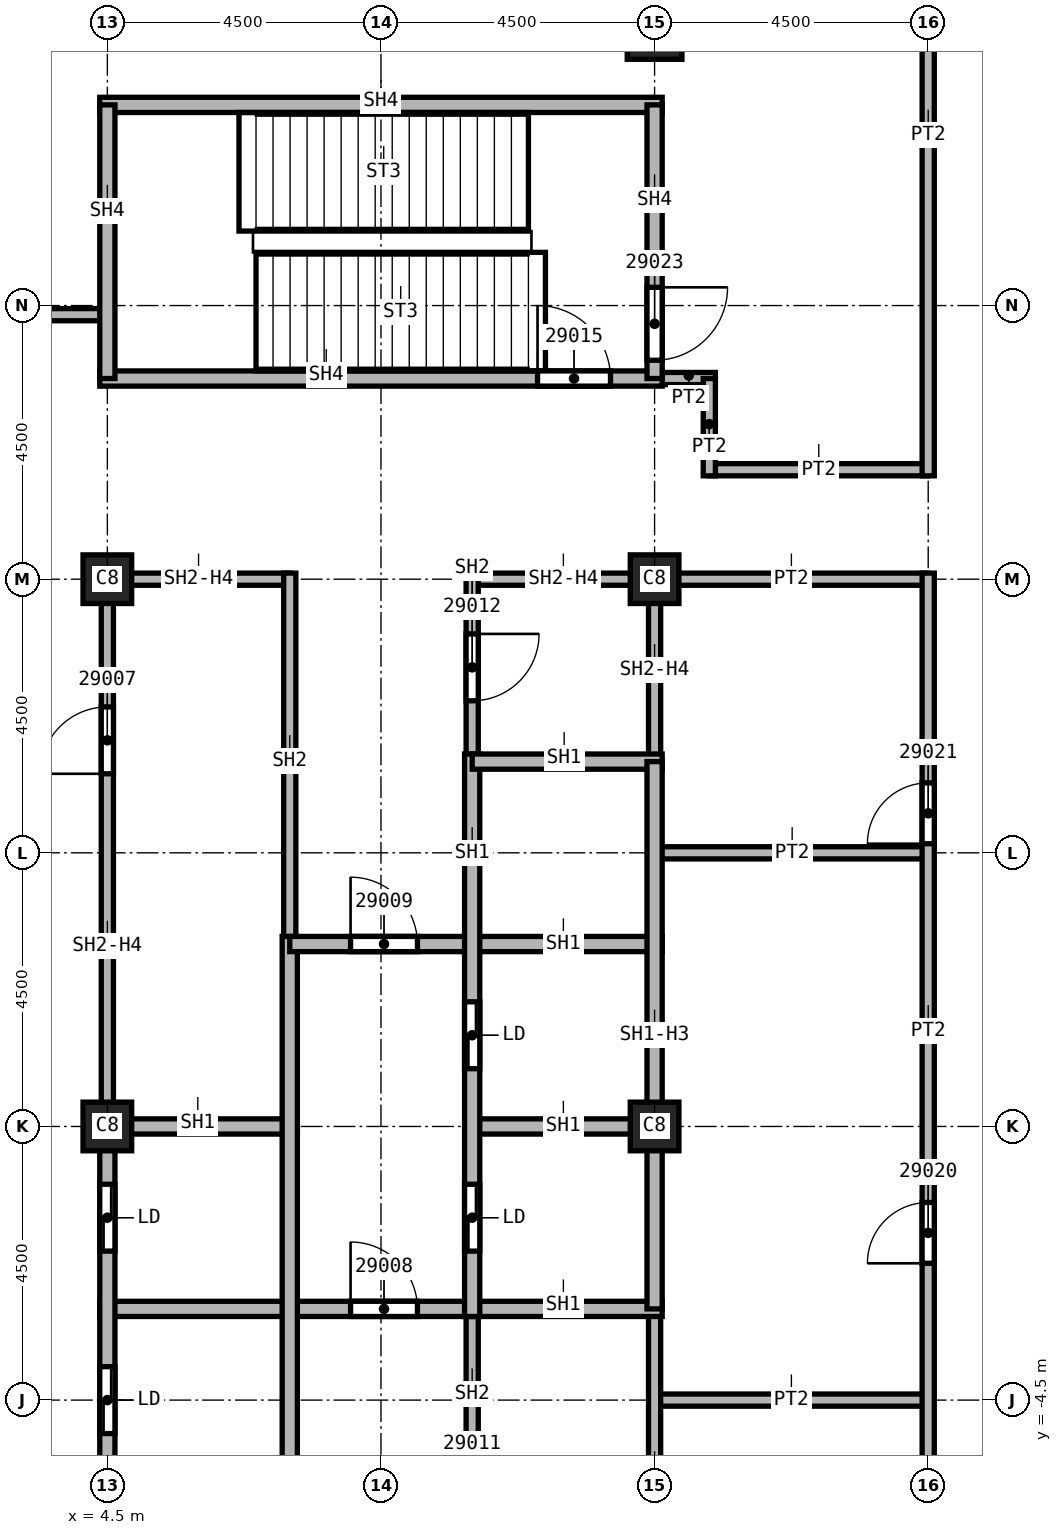
"""IFC4 building model, lengths in metres.
Left out: names, types, materials, properties, quantities, classifications, styles, units other than length and angle.
Written with IfcOpenShell. Run it as: python <this file> out.ifc"""

import sys

from ifc_helpers import new_model, si_unit, direction, frame, frame_2d, origin, origin_2d, place, context, subcontext, project, spatial, rectangle, extrude, element, fill, save


model = new_model("IFC4")
c1 = context("Model", 3, precision=1e-05, world=origin(), true_north=direction((0.0, 1.0)))
c2 = subcontext(c1, "Body", "Model", "MODEL_VIEW")
j1 = project(units=[si_unit("LENGTHUNIT", "METRE"), si_unit("PLANEANGLEUNIT", "RADIAN")], contexts=[c1])
p1 = place(None, origin())
s1 = spatial("IfcSite", under=j1, at=p1, CompositionType="ELEMENT")
p2 = place(p1, origin())
s2 = spatial("IfcBuilding", under=s1, at=p2, CompositionType="ELEMENT")
p3 = place(p2, frame((0.0, 0.0, 294.0)))
s3 = spatial("IfcBuildingStorey", under=s2, at=p3, CompositionType="ELEMENT", Elevation=294.0)
p4 = place(p3, frame((13.5, 18.0, 0.0), z_axis=(0.0, 0.0, 1.0), x_axis=(1.0, 0.0, 0.0)))
e1 = element("IfcColumn", 1, at=p4, inside=s3, PredefinedType="COLUMN", context=c2, shape_type="SweptSolid", body=[
    extrude(rectangle(XDim=0.9, YDim=0.9, at=origin_2d()), origin(), (0.0, 0.0, 1.0), 5.74),
])
for number, where, z_axis, x_axis in (
    (2, (4.5, 0.0, 0.0), (0.0, 0.0, 1.0), (1.0, 0.0, 0.0)),
    (3, (4.5, 9.0, 0.0), (0.0, 0.0, 1.0), (1.0, 0.0, 0.0)),
    (4, (13.5, 0.0, 0.0), (0.0, 0.0, 1.0), (1.0, 0.0, 0.0)),
    (5, (13.5, 9.0, 0.0), (0.0, 0.0, 1.0), (1.0, 0.0, 0.0)),
):
    element("IfcColumn", number, at=place(p3, frame(where, z_axis=z_axis, x_axis=x_axis)), inside=s3, PredefinedType="COLUMN", context=c2, shape_type="SweptSolid", body=[
        extrude(rectangle(XDim=0.8, YDim=0.8, at=origin_2d()), origin(), (0.0, 0.0, 1.0), 5.74),
    ])
p5 = place(p3, frame((-4.5, 13.35, 0.0), z_axis=(0.0, 0.0, 1.0), x_axis=(1.0, 0.0, 0.0)))
e6 = element("IfcWall", 6, at=p5, inside=s3, PredefinedType="PARTITIONING", context=c2, shape_type="SweptSolid", body=[
    extrude(rectangle(XDim=9.0, YDim=0.2, at=frame_2d((4.5, 0.0))), origin(), (0.0, 0.0, 1.0), 5.74),
])
p6 = place(p3, frame((13.375, 12.3, 0.0), z_axis=(0.0, 0.0, 1.0), x_axis=(1.0, 0.0, 0.0)))
e7 = element("IfcWall", 7, at=p6, inside=s3, PredefinedType="PARTITIONING", context=c2, shape_type="SweptSolid", body=[
    extrude(rectangle(XDim=1.125, YDim=0.2, at=frame_2d((0.562, 0.0))), origin(), (0.0, 0.0, 1.0), 5.74),
])
for number, where, z_axis, x_axis in (
    (8, (13.5, -4.5, 0.0), (0.0, 0.0, 1.0), (1.0, 0.0, 0.0)),
    (9, (13.5, 4.5, 0.0), (0.0, 0.0, 1.0), (1.0, 0.0, 0.0)),
    (10, (18.0, 9.0, 0.0), (0.0, 0.0, 1.0), (-1.0, 0.0, 0.0)),
):
    element("IfcWall", number, at=place(p3, frame(where, z_axis=z_axis, x_axis=x_axis)), inside=s3, PredefinedType="PARTITIONING", context=c2, shape_type="SweptSolid", body=[
        extrude(rectangle(XDim=4.5, YDim=0.2, at=frame_2d((2.25, 0.0))), origin(), (0.0, 0.0, 1.0), 5.74),
    ])
p7 = place(p3, frame((14.4, 10.8, 0.0), z_axis=(0.0, 0.0, 1.0), x_axis=(1.0, 0.0, 0.0)))
e11 = element("IfcWall", 11, at=p7, inside=s3, PredefinedType="PARTITIONING", context=c2, shape_type="SweptSolid", body=[
    extrude(rectangle(XDim=3.6, YDim=0.2, at=frame_2d((1.8, 0.0))), origin(), (0.0, 0.0, 1.0), 5.74),
])
p8 = place(p3, frame((14.4, 12.3, 0.0), z_axis=(0.0, 0.0, 1.0), x_axis=(0.0, -1.0, 0.0)))
e12 = element("IfcWall", 12, at=p8, inside=s3, PredefinedType="PARTITIONING", context=c2, shape_type="SweptSolid", body=[
    extrude(rectangle(XDim=1.6, YDim=0.2, at=frame_2d((0.8, 0.0))), origin(), (0.0, 0.0, 1.0), 5.74),
])
p9 = place(p3, frame((18.0, -9.1, 0.0), z_axis=(0.0, 0.0, 1.0), x_axis=(0.0, 1.0, 0.0)))
e13 = element("IfcWall", 13, at=p9, inside=s3, PredefinedType="PARTITIONING", context=c2, shape_type="SweptSolid", body=[
    extrude(rectangle(XDim=18.2, YDim=0.2, at=frame_2d((9.1, 0.0))), origin(), (0.0, 0.0, 1.0), 5.74),
])
p10 = place(p9, frame((1.0, 0.0, 0.0)))
e14 = element("IfcOpeningElement", 14, at=p10, cuts=e13, PredefinedType="OPENING", context=c2, shape_type="SweptSolid", body=[
    extrude(rectangle(XDim=1.0, YDim=2.1, at=frame_2d((0.5, 1.05))), frame((0.0, 0.1, 0.0), z_axis=(0.0, -1.0, 0.0), x_axis=(1.0, 0.0, 0.0)), (0.0, 0.0, 1.0), 0.2),
])
p11 = place(p9, frame((6.85, 0.0, 0.0)))
e15 = element("IfcOpeningElement", 15, at=p11, cuts=e13, PredefinedType="OPENING", context=c2, shape_type="SweptSolid", body=[
    extrude(rectangle(XDim=1.0, YDim=2.1, at=frame_2d((0.5, 1.05))), frame((0.0, 0.1, 0.0), z_axis=(0.0, -1.0, 0.0), x_axis=(1.0, 0.0, 0.0)), (0.0, 0.0, 1.0), 0.2),
])
p12 = place(p9, frame((13.75, 0.0, 0.0)))
e16 = element("IfcOpeningElement", 16, at=p12, cuts=e13, PredefinedType="OPENING", context=c2, shape_type="SweptSolid", body=[
    extrude(rectangle(XDim=1.0, YDim=2.1, at=frame_2d((0.5, 1.05))), frame((0.0, 0.1, 0.0), z_axis=(0.0, -1.0, 0.0), x_axis=(1.0, 0.0, 0.0)), (0.0, 0.0, 1.0), 0.2),
])
p13 = place(p3, frame((18.0, 10.7, 0.0), z_axis=(0.0, 0.0, 1.0), x_axis=(0.0, 1.0, 0.0)))
e17 = element("IfcWall", 17, at=p13, inside=s3, PredefinedType="PARTITIONING", context=c2, shape_type="SweptSolid", body=[
    extrude(rectangle(XDim=11.2, YDim=0.2, at=frame_2d((5.6, 0.0))), origin(), (0.0, 0.0, 1.0), 5.74),
])
p14 = place(p3, frame((4.5, 0.0, 0.0), z_axis=(0.0, 0.0, 1.0), x_axis=(0.0, 1.0, 0.0)))
e18 = element("IfcWall", 18, at=p14, inside=s3, PredefinedType="SOLIDWALL", context=c2, shape_type="SweptSolid", body=[
    extrude(rectangle(XDim=9.1, YDim=0.2, at=frame_2d((4.55, 0.0))), origin(), (0.0, 0.0, 1.0), 5.062),
])
p15 = place(p14, frame((5.8, 0.0, 0.0)))
e19 = element("IfcOpeningElement", 19, at=p15, cuts=e18, PredefinedType="OPENING", context=c2, shape_type="SweptSolid", body=[
    extrude(rectangle(XDim=1.1, YDim=2.1, at=frame_2d((0.55, 1.05))), frame((0.0, 0.1, 0.0), z_axis=(0.0, -1.0, 0.0), x_axis=(1.0, 0.0, 0.0)), (0.0, 0.0, 1.0), 0.2),
])
p16 = place(p3, frame((4.5, 9.0, 0.0), z_axis=(0.0, 0.0, 1.0), x_axis=(1.0, 0.0, 0.0)))
e20 = element("IfcWall", 20, at=p16, inside=s3, PredefinedType="SOLIDWALL", context=c2, shape_type="SweptSolid", body=[
    extrude(rectangle(XDim=3.0, YDim=0.2, at=frame_2d((1.5, 0.0))), origin(), (0.0, 0.0, 1.0), 5.062),
])
p17 = place(p3, frame((7.5, 9.1, 0.0), z_axis=(0.0, 0.0, 1.0), x_axis=(0.0, -1.0, 0.0)))
e21 = element("IfcWall", 21, at=p17, inside=s3, PredefinedType="SOLIDWALL", context=c2, shape_type="SweptSolid", body=[
    extrude(rectangle(XDim=6.225, YDim=0.2, at=frame_2d((3.113, 0.0))), origin(), (0.0, 0.0, 1.0), 5.74),
])
p18 = place(p3, frame((10.5, -2.875, 0.0), z_axis=(0.0, 0.0, 1.0), x_axis=(0.0, -1.0, 0.0)))
e22 = element("IfcWall", 22, at=p18, inside=s3, PredefinedType="SOLIDWALL", context=c2, shape_type="SweptSolid", body=[
    extrude(rectangle(XDim=4.2, YDim=0.2, at=frame_2d((2.1, 0.0))), origin(), (0.0, 0.0, 1.0), 5.74),
])
p19 = place(p18, frame((2.8, 0.0, 0.0)))
e23 = element("IfcOpeningElement", 23, at=p19, cuts=e22, PredefinedType="OPENING", context=c2, shape_type="SweptSolid", body=[
    extrude(rectangle(XDim=1.1, YDim=2.1, at=frame_2d((0.55, 1.05))), frame((0.0, 0.1, 0.0), z_axis=(0.0, -1.0, 0.0), x_axis=(1.0, 0.0, 0.0)), (0.0, 0.0, 1.0), 0.2),
])
p20 = place(p3, frame((10.5, 9.0, 0.0), z_axis=(0.0, 0.0, 1.0), x_axis=(1.0, 0.0, 0.0)))
e24 = element("IfcWall", 24, at=p20, inside=s3, PredefinedType="SOLIDWALL", context=c2, shape_type="SweptSolid", body=[
    extrude(rectangle(XDim=3.1, YDim=0.2, at=frame_2d((1.55, 0.0))), origin(), (0.0, 0.0, 1.0), 5.062),
])
p21 = place(p3, frame((10.5, 9.1, 0.0), z_axis=(0.0, 0.0, 1.0), x_axis=(0.0, -1.0, 0.0)))
e25 = element("IfcWall", 25, at=p21, inside=s3, PredefinedType="SOLIDWALL", context=c2, shape_type="SweptSolid", body=[
    extrude(rectangle(XDim=3.225, YDim=0.2, at=frame_2d((1.613, 0.0))), origin(), (0.0, 0.0, 1.0), 5.74),
])
p22 = place(p21, frame((1.0, 0.0, 0.0)))
e26 = element("IfcOpeningElement", 26, at=p22, cuts=e25, PredefinedType="OPENING", context=c2, shape_type="SweptSolid", body=[
    extrude(rectangle(XDim=1.1, YDim=2.1, at=frame_2d((0.55, 1.05))), frame((0.0, 0.1, 0.0), z_axis=(0.0, -1.0, 0.0), x_axis=(1.0, 0.0, 0.0)), (0.0, 0.0, 1.0), 0.2),
])
p23 = place(p3, frame((13.5, -3.0, 0.0), z_axis=(0.0, 0.0, 1.0), x_axis=(0.0, -1.0, 0.0)))
e27 = element("IfcWall", 27, at=p23, inside=s3, PredefinedType="SOLIDWALL", context=c2, shape_type="SweptSolid", body=[
    extrude(rectangle(XDim=4.0, YDim=0.2, at=frame_2d((2.0, 0.0))), origin(), (0.0, 0.0, 1.0), 5.062),
])
p24 = place(p3, frame((13.5, 9.1, 0.0), z_axis=(0.0, 0.0, 1.0), x_axis=(0.0, -1.0, 0.0)))
e28 = element("IfcWall", 28, at=p24, inside=s3, PredefinedType="SOLIDWALL", context=c2, shape_type="SweptSolid", body=[
    extrude(rectangle(XDim=3.1, YDim=0.2, at=frame_2d((1.55, 0.0))), origin(), (0.0, 0.0, 1.0), 5.062),
])
p25 = place(p3, frame((4.375, -3.0, 0.0), z_axis=(0.0, 0.0, 1.0), x_axis=(1.0, 0.0, 0.0)))
e29 = element("IfcWall", 29, at=p25, inside=s3, PredefinedType="SOLIDWALL", context=c2, shape_type="SweptSolid", body=[
    extrude(rectangle(XDim=9.25, YDim=0.25, at=frame_2d((4.625, 0.0))), origin(), (0.0, 0.0, 1.0), 5.74),
])
p26 = place(p25, frame((4.125, 0.0, 0.0)))
e30 = element("IfcOpeningElement", 30, at=p26, cuts=e29, PredefinedType="OPENING", context=c2, shape_type="SweptSolid", body=[
    extrude(rectangle(XDim=1.1, YDim=2.1, at=frame_2d((0.55, 1.05))), frame((0.0, 0.125, 0.0), z_axis=(0.0, -1.0, 0.0), x_axis=(1.0, 0.0, 0.0)), (0.0, 0.0, 1.0), 0.25),
])
p27 = place(p3, frame((4.375, 0.0, 0.0), z_axis=(0.0, 0.0, 1.0), x_axis=(1.0, 0.0, 0.0)))
e31 = element("IfcWall", 31, at=p27, inside=s3, PredefinedType="SOLIDWALL", context=c2, shape_type="SweptSolid", body=[
    extrude(rectangle(XDim=3.25, YDim=0.25, at=frame_2d((1.625, 0.0))), origin(), (0.0, 0.0, 1.0), 5.74),
])
p28 = place(p3, frame((4.5, -9.125, 0.0), z_axis=(0.0, 0.0, 1.0), x_axis=(0.0, 1.0, 0.0)))
e32 = element("IfcWall", 32, at=p28, inside=s3, PredefinedType="SOLIDWALL", context=c2, shape_type="SweptSolid", body=[
    extrude(rectangle(XDim=9.125, YDim=0.25, at=frame_2d((4.562, 0.0))), origin(), (0.0, 0.0, 1.0), 5.062),
])
p29 = place(p28, frame((1.012, 0.0, 0.0)))
e33 = element("IfcOpeningElement", 33, at=p29, cuts=e32, PredefinedType="OPENING", context=c2, shape_type="SweptSolid", body=[
    extrude(rectangle(XDim=1.1, YDim=2.1, at=frame_2d((0.55, 1.05))), frame((0.0, 0.125, 0.0), z_axis=(0.0, -1.0, 0.0), x_axis=(1.0, 0.0, 0.0)), (0.0, 0.0, 1.0), 0.25),
])
p30 = place(p28, frame((4.075, 0.0, 0.0)))
e34 = element("IfcOpeningElement", 34, at=p30, cuts=e32, PredefinedType="OPENING", context=c2, shape_type="SweptSolid", body=[
    extrude(rectangle(XDim=1.1, YDim=2.1, at=frame_2d((0.55, 1.05))), frame((0.0, 0.125, 0.0), z_axis=(0.0, -1.0, 0.0), x_axis=(1.0, 0.0, 0.0)), (0.0, 0.0, 1.0), 0.25),
])
p31 = place(p28, frame((7.075, 0.0, 0.0)))
e35 = element("IfcOpeningElement", 35, at=p31, cuts=e32, PredefinedType="OPENING", context=c2, shape_type="SweptSolid", body=[
    extrude(rectangle(XDim=1.1, YDim=2.1, at=frame_2d((0.55, 1.05))), frame((0.0, 0.125, 0.0), z_axis=(0.0, -1.0, 0.0), x_axis=(1.0, 0.0, 0.0)), (0.0, 0.0, 1.0), 0.25),
])
p32 = place(p3, frame((7.5, 3.125, 0.0), z_axis=(0.0, 0.0, 1.0), x_axis=(0.0, -1.0, 0.0)))
e36 = element("IfcWall", 36, at=p32, inside=s3, PredefinedType="SOLIDWALL", context=c2, shape_type="SweptSolid", body=[
    extrude(rectangle(XDim=12.25, YDim=0.25, at=frame_2d((6.125, 0.0))), origin(), (0.0, 0.0, 1.0), 5.74),
])
p33 = place(p3, frame((7.5, 3.0, 0.0), z_axis=(0.0, 0.0, 1.0), x_axis=(1.0, 0.0, 0.0)))
e37 = element("IfcWall", 37, at=p33, inside=s3, PredefinedType="SOLIDWALL", context=c2, shape_type="SweptSolid", body=[
    extrude(rectangle(XDim=6.125, YDim=0.25, at=frame_2d((3.062, 0.0))), origin(), (0.0, 0.0, 1.0), 5.74),
])
p34 = place(p33, frame((1.0, 0.0, 0.0)))
e38 = element("IfcOpeningElement", 38, at=p34, cuts=e37, PredefinedType="OPENING", context=c2, shape_type="SweptSolid", body=[
    extrude(rectangle(XDim=1.1, YDim=2.1, at=frame_2d((0.55, 1.05))), frame((0.0, 0.125, 0.0), z_axis=(0.0, -1.0, 0.0), x_axis=(1.0, 0.0, 0.0)), (0.0, 0.0, 1.0), 0.25),
])
p35 = place(p3, frame((10.5, 0.0, 0.0), z_axis=(0.0, 0.0, 1.0), x_axis=(1.0, 0.0, 0.0)))
e39 = element("IfcWall", 39, at=p35, inside=s3, PredefinedType="SOLIDWALL", context=c2, shape_type="SweptSolid", body=[
    extrude(rectangle(XDim=3.125, YDim=0.25, at=frame_2d((1.562, 0.0))), origin(), (0.0, 0.0, 1.0), 5.74),
])
p36 = place(p3, frame((10.5, 6.125, 0.0), z_axis=(0.0, 0.0, 1.0), x_axis=(0.0, -1.0, 0.0)))
e40 = element("IfcWall", 40, at=p36, inside=s3, PredefinedType="SOLIDWALL", context=c2, shape_type="SweptSolid", body=[
    extrude(rectangle(XDim=9.25, YDim=0.25, at=frame_2d((4.625, 0.0))), origin(), (0.0, 0.0, 1.0), 5.74),
])
p37 = place(p36, frame((7.075, 0.0, 0.0)))
e41 = element("IfcOpeningElement", 41, at=p37, cuts=e40, PredefinedType="OPENING", context=c2, shape_type="SweptSolid", body=[
    extrude(rectangle(XDim=1.1, YDim=2.1, at=frame_2d((0.55, 1.05))), frame((0.0, 0.125, 0.0), z_axis=(0.0, -1.0, 0.0), x_axis=(1.0, 0.0, 0.0)), (0.0, 0.0, 1.0), 0.25),
])
p38 = place(p36, frame((4.075, 0.0, 0.0)))
e42 = element("IfcOpeningElement", 42, at=p38, cuts=e40, PredefinedType="OPENING", context=c2, shape_type="SweptSolid", body=[
    extrude(rectangle(XDim=1.1, YDim=2.1, at=frame_2d((0.55, 1.05))), frame((0.0, 0.125, 0.0), z_axis=(0.0, -1.0, 0.0), x_axis=(1.0, 0.0, 0.0)), (0.0, 0.0, 1.0), 0.25),
])
p39 = place(p3, frame((10.5, 6.0, 0.0), z_axis=(0.0, 0.0, 1.0), x_axis=(1.0, 0.0, 0.0)))
e43 = element("IfcWall", 43, at=p39, inside=s3, PredefinedType="SOLIDWALL", context=c2, shape_type="SweptSolid", body=[
    extrude(rectangle(XDim=3.125, YDim=0.25, at=frame_2d((1.562, 0.0))), origin(), (0.0, 0.0, 1.0), 5.74),
])
p40 = place(p3, frame((13.5, 6.0, 0.0), z_axis=(0.0, 0.0, 1.0), x_axis=(0.0, -1.0, 0.0)))
e44 = element("IfcWall", 44, at=p40, inside=s3, PredefinedType="SOLIDWALL", context=c2, shape_type="SweptSolid", body=[
    extrude(rectangle(XDim=9.0, YDim=0.25, at=frame_2d((4.5, 0.0))), origin(), (0.0, 0.0, 1.0), 5.062),
])
p41 = place(p3, frame((4.375, 12.3, 0.0), z_axis=(0.0, 0.0, 1.0), x_axis=(1.0, 0.0, 0.0)))
e45 = element("IfcWall", 45, at=p41, inside=s3, PredefinedType="SOLIDWALL", context=c2, shape_type="SweptSolid", body=[
    extrude(rectangle(XDim=9.25, YDim=0.25, at=frame_2d((4.625, 0.0))), origin(), (0.0, 0.0, 1.0), 5.74),
])
p42 = place(p41, frame((7.2, 0.0, 0.0)))
e46 = element("IfcOpeningElement", 46, at=p42, cuts=e45, PredefinedType="OPENING", context=c2, shape_type="SweptSolid", body=[
    extrude(rectangle(XDim=1.2, YDim=2.1, at=frame_2d((0.6, 1.05))), frame((0.0, 0.125, 0.0), z_axis=(0.0, -1.0, 0.0), x_axis=(1.0, 0.0, 0.0)), (0.0, 0.0, 1.0), 0.25),
])
p43 = place(p3, frame((4.375, 16.8, 0.0), z_axis=(0.0, 0.0, 1.0), x_axis=(1.0, 0.0, 0.0)))
e47 = element("IfcWall", 47, at=p43, inside=s3, PredefinedType="SOLIDWALL", context=c2, shape_type="SweptSolid", body=[
    extrude(rectangle(XDim=9.25, YDim=0.25, at=frame_2d((4.625, 0.0))), origin(), (0.0, 0.0, 1.0), 5.74),
])
p44 = place(p3, frame((4.5, 12.3, 0.0), z_axis=(0.0, 0.0, 1.0), x_axis=(0.0, 1.0, 0.0)))
e48 = element("IfcWall", 48, at=p44, inside=s3, PredefinedType="SOLIDWALL", context=c2, shape_type="SweptSolid", body=[
    extrude(rectangle(XDim=4.5, YDim=0.25, at=frame_2d((2.25, 0.0))), origin(), (0.0, 0.0, 1.0), 5.74),
])
p45 = place(p3, frame((13.5, 16.8, 0.0), z_axis=(0.0, 0.0, 1.0), x_axis=(0.0, -1.0, 0.0)))
e49 = element("IfcWall", 49, at=p45, inside=s3, PredefinedType="SOLIDWALL", context=c2, shape_type="SweptSolid", body=[
    extrude(rectangle(XDim=4.5, YDim=0.25, at=frame_2d((2.25, 0.0))), origin(), (0.0, 0.0, 1.0), 5.74),
])
p46 = place(p45, frame((3.0, 0.0, 0.0)))
e50 = element("IfcOpeningElement", 50, at=p46, cuts=e49, PredefinedType="OPENING", context=c2, shape_type="SweptSolid", body=[
    extrude(rectangle(XDim=1.2, YDim=2.1, at=frame_2d((0.6, 1.05))), frame((0.0, 0.125, 0.0), z_axis=(0.0, -1.0, 0.0), x_axis=(1.0, 0.0, 0.0)), (0.0, 0.0, 1.0), 0.25),
])
p47 = place(p15, origin())
e51 = element("IfcDoor", 51, at=p47, inside=s3, OperationType="SINGLE_SWING_RIGHT", PredefinedType="DOOR", context=c2, shape_type="SweptSolid", body=[
    extrude(rectangle(XDim=1.1, YDim=2.1, at=frame_2d((0.55, 1.05))), frame((0.0, 0.025, 0.0), z_axis=(0.0, -1.0, 0.0), x_axis=(1.0, 0.0, 0.0)), (0.0, 0.0, 1.0), 0.05),
])
fill(e19, e51)
p48 = place(p26, origin())
e52 = element("IfcDoor", 52, at=p48, inside=s3, OperationType="SINGLE_SWING_LEFT", PredefinedType="DOOR", context=c2, shape_type="SweptSolid", body=[
    extrude(rectangle(XDim=1.1, YDim=2.1, at=frame_2d((0.55, 1.05))), frame((0.0, 0.025, 0.0), z_axis=(0.0, -1.0, 0.0), x_axis=(1.0, 0.0, 0.0)), (0.0, 0.0, 1.0), 0.05),
])
fill(e30, e52)
p49 = place(p34, origin())
e53 = element("IfcDoor", 53, at=p49, inside=s3, OperationType="SINGLE_SWING_RIGHT", PredefinedType="DOOR", context=c2, shape_type="SweptSolid", body=[
    extrude(rectangle(XDim=1.1, YDim=2.1, at=frame_2d((0.55, 1.05))), frame((0.0, 0.025, 0.0), z_axis=(0.0, -1.0, 0.0), x_axis=(1.0, 0.0, 0.0)), (0.0, 0.0, 1.0), 0.05),
])
fill(e38, e53)
p50 = place(p22, origin())
e54 = element("IfcDoor", 54, at=p50, inside=s3, OperationType="SINGLE_SWING_LEFT", PredefinedType="DOOR", context=c2, shape_type="SweptSolid", body=[
    extrude(rectangle(XDim=1.1, YDim=2.1, at=frame_2d((0.55, 1.05))), frame((0.0, 0.025, 0.0), z_axis=(0.0, -1.0, 0.0), x_axis=(1.0, 0.0, 0.0)), (0.0, 0.0, 1.0), 0.05),
])
fill(e26, e54)
p51 = place(p42, origin())
e55 = element("IfcDoor", 55, at=p51, inside=s3, OperationType="SINGLE_SWING_RIGHT", PredefinedType="DOOR", context=c2, shape_type="SweptSolid", body=[
    extrude(rectangle(XDim=1.2, YDim=2.1, at=frame_2d((0.6, 1.05))), frame((0.0, 0.025, 0.0), z_axis=(0.0, -1.0, 0.0), x_axis=(1.0, 0.0, 0.0)), (0.0, 0.0, 1.0), 0.05),
])
fill(e46, e55)
p52 = place(p11, origin())
e56 = element("IfcDoor", 56, at=p52, inside=s3, OperationType="SINGLE_SWING_LEFT", PredefinedType="DOOR", context=c2, shape_type="SweptSolid", body=[
    extrude(rectangle(XDim=1.0, YDim=2.1, at=frame_2d((0.5, 1.05))), frame((0.0, 0.025, 0.0), z_axis=(0.0, -1.0, 0.0), x_axis=(1.0, 0.0, 0.0)), (0.0, 0.0, 1.0), 0.05),
])
fill(e15, e56)
p53 = place(p12, origin())
e57 = element("IfcDoor", 57, at=p53, inside=s3, OperationType="SINGLE_SWING_RIGHT", PredefinedType="DOOR", context=c2, shape_type="SweptSolid", body=[
    extrude(rectangle(XDim=1.0, YDim=2.1, at=frame_2d((0.5, 1.05))), frame((0.0, 0.025, 0.0), z_axis=(0.0, -1.0, 0.0), x_axis=(1.0, 0.0, 0.0)), (0.0, 0.0, 1.0), 0.05),
])
fill(e16, e57)
p54 = place(p46, origin())
e58 = element("IfcDoor", 58, at=p54, inside=s3, OperationType="SINGLE_SWING_RIGHT", PredefinedType="DOOR", context=c2, shape_type="SweptSolid", body=[
    extrude(rectangle(XDim=1.2, YDim=2.1, at=frame_2d((0.6, 1.05))), frame((0.0, 0.025, 0.0), z_axis=(0.0, -1.0, 0.0), x_axis=(1.0, 0.0, 0.0)), (0.0, 0.0, 1.0), 0.05),
])
fill(e50, e58)
p55 = place(p30, origin())
e59 = element("IfcDoor", 59, at=p55, inside=s3, OperationType="SLIDING_TO_LEFT", PredefinedType="DOOR", context=c2, shape_type="SweptSolid", body=[
    extrude(rectangle(XDim=1.1, YDim=2.1, at=frame_2d((0.55, 1.05))), frame((0.0, 0.025, 0.0), z_axis=(0.0, -1.0, 0.0), x_axis=(1.0, 0.0, 0.0)), (0.0, 0.0, 1.0), 0.05),
])
fill(e34, e59)
p56 = place(p31, origin())
e60 = element("IfcDoor", 60, at=p56, inside=s3, OperationType="SLIDING_TO_LEFT", PredefinedType="DOOR", context=c2, shape_type="SweptSolid", body=[
    extrude(rectangle(XDim=1.1, YDim=2.1, at=frame_2d((0.55, 1.05))), frame((0.0, 0.025, 0.0), z_axis=(0.0, -1.0, 0.0), x_axis=(1.0, 0.0, 0.0)), (0.0, 0.0, 1.0), 0.05),
])
fill(e35, e60)
p57 = place(p37, origin())
e61 = element("IfcDoor", 61, at=p57, inside=s3, OperationType="SLIDING_TO_LEFT", PredefinedType="DOOR", context=c2, shape_type="SweptSolid", body=[
    extrude(rectangle(XDim=1.1, YDim=2.1, at=frame_2d((0.55, 1.05))), frame((0.0, 0.025, 0.0), z_axis=(0.0, -1.0, 0.0), x_axis=(1.0, 0.0, 0.0)), (0.0, 0.0, 1.0), 0.05),
])
fill(e41, e61)
p58 = place(p38, origin())
e62 = element("IfcDoor", 62, at=p58, inside=s3, OperationType="SLIDING_TO_LEFT", PredefinedType="DOOR", context=c2, shape_type="SweptSolid", body=[
    extrude(rectangle(XDim=1.1, YDim=2.1, at=frame_2d((0.55, 1.05))), frame((0.0, 0.025, 0.0), z_axis=(0.0, -1.0, 0.0), x_axis=(1.0, 0.0, 0.0)), (0.0, 0.0, 1.0), 0.05),
])
fill(e42, e62)
save(model, sys.argv[1])
